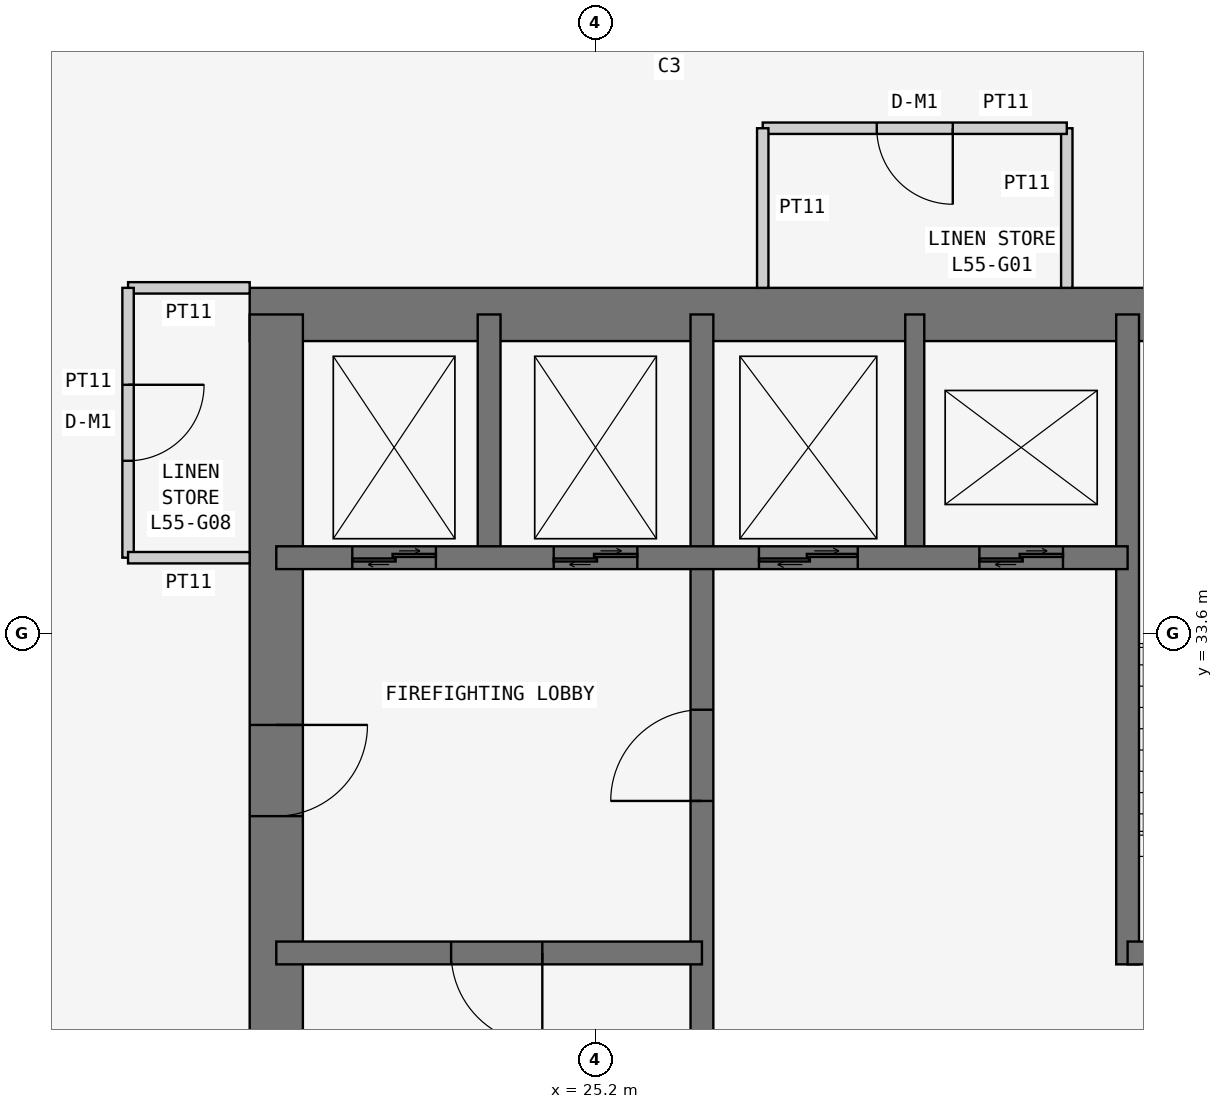
"""IFC4 building model, lengths in metres.
Left out: names, types, materials, properties, quantities, classifications, styles, units other than length and angle.
Written with IfcOpenShell. Run it as: python <this file> out.ifc"""

import sys

from ifc_helpers import new_model, si_unit, direction, frame, frame_2d, origin, place, context, subcontext, project, spatial, rectangle, extrude, element, fill, save


model = new_model("IFC4")
c1 = context("Model", 3, precision=1e-05, world=origin(), true_north=direction((0.0, 1.0)))
c2 = subcontext(c1, "Body", "Model", "MODEL_VIEW")
j1 = project(units=[si_unit("LENGTHUNIT", "METRE"), si_unit("PLANEANGLEUNIT", "RADIAN")], contexts=[c1])
p1 = place(None, origin())
s1 = spatial("IfcSite", under=j1, at=p1, CompositionType="ELEMENT")
p2 = place(p1, origin())
s2 = spatial("IfcBuilding", under=s1, at=p2, CompositionType="ELEMENT")
p3 = place(p2, frame((0.0, 0.0, 212.1)))
s3 = spatial("IfcBuildingStorey", under=s2, at=p3, CompositionType="ELEMENT", Elevation=212.1)
p4 = place(p3, frame((37.8, 37.8, 0.0), z_axis=(0.0, 0.0, 1.0), x_axis=(-1.0, 0.0, 0.0)))
e1 = element("IfcWall", 1, at=p4, inside=s3, PredefinedType="SHEAR", context=c2, shape_type="SweptSolid", body=[
    extrude(rectangle(XDim=17.15, YDim=0.7, at=frame_2d((8.575, 0.0))), origin(), (0.0, 0.0, 1.0), 3.6),
])
p5 = place(p3, frame((21.0, 37.8, 0.0), z_axis=(0.0, 0.0, 1.0), x_axis=(0.0, -1.0, 0.0)))
e2 = element("IfcWall", 2, at=p5, inside=s3, PredefinedType="SHEAR", context=c2, shape_type="SweptSolid", body=[
    extrude(rectangle(XDim=17.15, YDim=0.7, at=frame_2d((8.575, 0.0))), origin(), (0.0, 0.0, 1.0), 3.6),
])
p6 = place(p5, frame((5.4, 0.0, 0.0)))
e3 = element("IfcOpeningElement", 3, at=p6, cuts=e2, PredefinedType="OPENING", context=c2, shape_type="SweptSolid", body=[
    extrude(rectangle(XDim=1.2, YDim=2.1, at=frame_2d((0.6, 1.05))), frame((0.0, 0.36, 0.0), z_axis=(0.0, -1.0, 0.0), x_axis=(1.0, 0.0, 0.0)), (0.0, 0.0, 1.0), 0.72),
])
p7 = place(p3, frame((26.6, 21.0, 0.0), z_axis=(0.0, 0.0, 1.0), x_axis=(0.0, 1.0, 0.0)))
e4 = element("IfcWall", 4, at=p7, inside=s3, PredefinedType="SHEAR", context=c2, shape_type="SweptSolid", body=[
    extrude(rectangle(XDim=16.8, YDim=0.3, at=frame_2d((8.4, 0.0))), origin(), (0.0, 0.0, 1.0), 3.6),
])
p8 = place(p7, frame((10.4, 0.0, 0.0)))
e5 = element("IfcOpeningElement", 5, at=p8, cuts=e4, PredefinedType="OPENING", context=c2, shape_type="SweptSolid", body=[
    extrude(rectangle(XDim=1.2, YDim=2.1, at=frame_2d((0.6, 1.05))), frame((0.0, 0.16, 0.0), z_axis=(0.0, -1.0, 0.0), x_axis=(1.0, 0.0, 0.0)), (0.0, 0.0, 1.0), 0.32),
])
p9 = place(p3, frame((21.0, 29.4, 0.0), z_axis=(0.0, 0.0, 1.0), x_axis=(1.0, 0.0, 0.0)))
e6 = element("IfcWall", 6, at=p9, inside=s3, PredefinedType="SHEAR", context=c2, shape_type="SweptSolid", body=[
    extrude(rectangle(XDim=5.6, YDim=0.3, at=frame_2d((2.8, 0.0))), origin(), (0.0, 0.0, 1.0), 3.6),
])
p10 = place(p9, frame((2.3, 0.0, 0.0)))
e7 = element("IfcOpeningElement", 7, at=p10, cuts=e6, PredefinedType="OPENING", context=c2, shape_type="SweptSolid", body=[
    extrude(rectangle(XDim=1.2, YDim=2.1, at=frame_2d((0.6, 1.05))), frame((0.0, 0.16, 0.0), z_axis=(0.0, -1.0, 0.0), x_axis=(1.0, 0.0, 0.0)), (0.0, 0.0, 1.0), 0.32),
])
p11 = place(p3, frame((21.0, 34.6, 0.0), z_axis=(0.0, 0.0, 1.0), x_axis=(1.0, 0.0, 0.0)))
e8 = element("IfcWall", 8, at=p11, inside=s3, PredefinedType="SHEAR", context=c2, shape_type="SweptSolid", body=[
    extrude(rectangle(XDim=11.2, YDim=0.3, at=frame_2d((5.6, 0.0))), origin(), (0.0, 0.0, 1.0), 3.6),
])
p12 = place(p11, frame((9.25, 0.0, 0.0)))
e9 = element("IfcOpeningElement", 9, at=p12, cuts=e8, PredefinedType="OPENING", context=c2, shape_type="SweptSolid", body=[
    extrude(rectangle(XDim=1.1, YDim=2.1, at=frame_2d((0.55, 1.05))), frame((0.0, 0.16, 0.0), z_axis=(0.0, -1.0, 0.0), x_axis=(1.0, 0.0, 0.0)), (0.0, 0.0, 1.0), 0.32),
])
p13 = place(p11, frame((1.0, 0.0, 0.0)))
e10 = element("IfcOpeningElement", 10, at=p13, cuts=e8, PredefinedType="OPENING", context=c2, shape_type="SweptSolid", body=[
    extrude(rectangle(XDim=1.1, YDim=2.1, at=frame_2d((0.55, 1.05))), frame((0.0, 0.16, 0.0), z_axis=(0.0, -1.0, 0.0), x_axis=(1.0, 0.0, 0.0)), (0.0, 0.0, 1.0), 0.32),
])
p14 = place(p11, frame((3.65, 0.0, 0.0)))
e11 = element("IfcOpeningElement", 11, at=p14, cuts=e8, PredefinedType="OPENING", context=c2, shape_type="SweptSolid", body=[
    extrude(rectangle(XDim=1.1, YDim=2.1, at=frame_2d((0.55, 1.05))), frame((0.0, 0.16, 0.0), z_axis=(0.0, -1.0, 0.0), x_axis=(1.0, 0.0, 0.0)), (0.0, 0.0, 1.0), 0.32),
])
p15 = place(p11, frame((6.35, 0.0, 0.0)))
e12 = element("IfcOpeningElement", 12, at=p15, cuts=e8, PredefinedType="OPENING", context=c2, shape_type="SweptSolid", body=[
    extrude(rectangle(XDim=1.3, YDim=2.1, at=frame_2d((0.65, 1.05))), frame((0.0, 0.16, 0.0), z_axis=(0.0, -1.0, 0.0), x_axis=(1.0, 0.0, 0.0)), (0.0, 0.0, 1.0), 0.32),
])
p16 = place(p3, frame((23.8, 34.6, 0.0), z_axis=(0.0, 0.0, 1.0), x_axis=(0.0, 1.0, 0.0)))
e13 = element("IfcWall", 13, at=p16, inside=s3, PredefinedType="SHEAR", context=c2, shape_type="SweptSolid", body=[
    extrude(rectangle(XDim=3.2, YDim=0.3, at=frame_2d((1.6, 0.0))), origin(), (0.0, 0.0, 1.0), 3.6),
])
p17 = place(p3, frame((32.2, 29.25, 0.0), z_axis=(0.0, 0.0, 1.0), x_axis=(0.0, 1.0, 0.0)))
e14 = element("IfcWall", 14, at=p17, inside=s3, PredefinedType="SHEAR", context=c2, shape_type="SweptSolid", body=[
    extrude(rectangle(XDim=8.55, YDim=0.3, at=frame_2d((4.275, 0.0))), origin(), (0.0, 0.0, 1.0), 3.6),
])
p18 = place(p3, frame((32.2, 29.4, 0.0), z_axis=(0.0, 0.0, 1.0), x_axis=(1.0, 0.0, 0.0)))
e15 = element("IfcWall", 15, at=p18, inside=s3, PredefinedType="SHEAR", context=c2, shape_type="SweptSolid", body=[
    extrude(rectangle(XDim=5.6, YDim=0.3, at=frame_2d((2.8, 0.0))), origin(), (0.0, 0.0, 1.0), 3.6),
])
p19 = place(p18, frame((2.0, 0.0, 0.0)))
e16 = element("IfcOpeningElement", 16, at=p19, cuts=e15, PredefinedType="OPENING", context=c2, shape_type="SweptSolid", body=[
    extrude(rectangle(XDim=1.2, YDim=2.1, at=frame_2d((0.6, 1.05))), frame((0.0, 0.16, 0.0), z_axis=(0.0, -1.0, 0.0), x_axis=(1.0, 0.0, 0.0)), (0.0, 0.0, 1.0), 0.32),
])
p20 = place(p3, frame((29.4, 34.6, 0.0), z_axis=(0.0, 0.0, 1.0), x_axis=(0.0, 1.0, 0.0)))
e17 = element("IfcWall", 17, at=p20, inside=s3, PredefinedType="SHEAR", context=c2, shape_type="SweptSolid", body=[
    extrude(rectangle(XDim=3.2, YDim=0.25, at=frame_2d((1.6, 0.0))), origin(), (0.0, 0.0, 1.0), 3.6),
])
p21 = place(p3, frame((31.4, 38.15, 0.0), z_axis=(0.0, 0.0, 1.0), x_axis=(0.0, 1.0, 0.0)))
e18 = element("IfcWall", 18, at=p21, inside=s3, PredefinedType="PARTITIONING", context=c2, shape_type="SweptSolid", body=[
    extrude(rectangle(XDim=2.1, YDim=0.15, at=frame_2d((1.05, 0.0))), origin(), (0.0, 0.0, 1.0), 3.45),
])
p22 = place(p3, frame((31.4, 40.25, 0.0), z_axis=(0.0, 0.0, 1.0), x_axis=(-1.0, 0.0, 0.0)))
e19 = element("IfcWall", 19, at=p22, inside=s3, PredefinedType="PARTITIONING", context=c2, shape_type="SweptSolid", body=[
    extrude(rectangle(XDim=4.0, YDim=0.15, at=frame_2d((2.0, 0.0))), origin(), (0.0, 0.0, 1.0), 3.45),
])
p23 = place(p22, frame((1.5, 0.0, 0.0)))
e20 = element("IfcOpeningElement", 20, at=p23, cuts=e19, PredefinedType="OPENING", context=c2, shape_type="SweptSolid", body=[
    extrude(rectangle(XDim=1.0, YDim=2.1, at=frame_2d((0.5, 1.05))), frame((0.0, 0.085, 0.0), z_axis=(0.0, -1.0, 0.0), x_axis=(1.0, 0.0, 0.0)), (0.0, 0.0, 1.0), 0.17),
])
p24 = place(p3, frame((27.4, 40.25, 0.0), z_axis=(0.0, 0.0, 1.0), x_axis=(0.0, -1.0, 0.0)))
e21 = element("IfcWall", 21, at=p24, inside=s3, PredefinedType="PARTITIONING", context=c2, shape_type="SweptSolid", body=[
    extrude(rectangle(XDim=2.1, YDim=0.15, at=frame_2d((1.05, 0.0))), origin(), (0.0, 0.0, 1.0), 3.45),
])
p25 = place(p3, frame((20.65, 38.15, 0.0), z_axis=(0.0, 0.0, 1.0), x_axis=(-1.0, 0.0, 0.0)))
e22 = element("IfcWall", 22, at=p25, inside=s3, PredefinedType="PARTITIONING", context=c2, shape_type="SweptSolid", body=[
    extrude(rectangle(XDim=1.6, YDim=0.15, at=frame_2d((0.8, 0.0))), origin(), (0.0, 0.0, 1.0), 3.45),
])
p26 = place(p3, frame((19.05, 38.15, 0.0), z_axis=(0.0, 0.0, 1.0), x_axis=(0.0, -1.0, 0.0)))
e23 = element("IfcWall", 23, at=p26, inside=s3, PredefinedType="PARTITIONING", context=c2, shape_type="SweptSolid", body=[
    extrude(rectangle(XDim=3.55, YDim=0.15, at=frame_2d((1.775, 0.0))), origin(), (0.0, 0.0, 1.0), 3.45),
])
p27 = place(p26, frame((1.275, 0.0, 0.0)))
e24 = element("IfcOpeningElement", 24, at=p27, cuts=e23, PredefinedType="OPENING", context=c2, shape_type="SweptSolid", body=[
    extrude(rectangle(XDim=1.0, YDim=2.1, at=frame_2d((0.5, 1.05))), frame((0.0, 0.085, 0.0), z_axis=(0.0, -1.0, 0.0), x_axis=(1.0, 0.0, 0.0)), (0.0, 0.0, 1.0), 0.17),
])
p28 = place(p3, frame((19.05, 34.6, 0.0), z_axis=(0.0, 0.0, 1.0), x_axis=(1.0, 0.0, 0.0)))
e25 = element("IfcWall", 25, at=p28, inside=s3, PredefinedType="PARTITIONING", context=c2, shape_type="SweptSolid", body=[
    extrude(rectangle(XDim=1.6, YDim=0.15, at=frame_2d((0.8, 0.0))), origin(), (0.0, 0.0, 1.0), 3.45),
])
p29 = place(p23, origin())
e26 = element("IfcDoor", 26, at=p29, inside=s3, OperationType="SINGLE_SWING_LEFT", PredefinedType="DOOR", context=c2, shape_type="SweptSolid", body=[
    extrude(rectangle(XDim=1.0, YDim=2.1, at=frame_2d((0.5, 1.05))), frame((0.0, 0.025, 0.0), z_axis=(0.0, -1.0, 0.0), x_axis=(1.0, 0.0, 0.0)), (0.0, 0.0, 1.0), 0.05),
])
fill(e20, e26)
p30 = place(p27, origin())
e27 = element("IfcDoor", 27, at=p30, inside=s3, OperationType="SINGLE_SWING_LEFT", PredefinedType="DOOR", context=c2, shape_type="SweptSolid", body=[
    extrude(rectangle(XDim=1.0, YDim=2.1, at=frame_2d((0.5, 1.05))), frame((0.0, 0.025, 0.0), z_axis=(0.0, -1.0, 0.0), x_axis=(1.0, 0.0, 0.0)), (0.0, 0.0, 1.0), 0.05),
])
fill(e24, e27)
p31 = place(p6, origin())
e28 = element("IfcDoor", 28, at=p31, inside=s3, OperationType="SINGLE_SWING_LEFT", PredefinedType="DOOR", context=c2, shape_type="SweptSolid", body=[
    extrude(rectangle(XDim=1.2, YDim=2.1, at=frame_2d((0.6, 1.05))), frame((0.0, 0.025, 0.0), z_axis=(0.0, -1.0, 0.0), x_axis=(1.0, 0.0, 0.0)), (0.0, 0.0, 1.0), 0.05),
])
fill(e3, e28)
p32 = place(p10, frame((1.2, 0.0, 0.0), z_axis=(0.0, 0.0, 1.0), x_axis=(-1.0, 0.0, 0.0)))
e29 = element("IfcDoor", 29, at=p32, inside=s3, OperationType="SINGLE_SWING_LEFT", PredefinedType="DOOR", context=c2, shape_type="SweptSolid", body=[
    extrude(rectangle(XDim=1.2, YDim=2.1, at=frame_2d((0.6, 1.05))), frame((0.0, 0.025, 0.0), z_axis=(0.0, -1.0, 0.0), x_axis=(1.0, 0.0, 0.0)), (0.0, 0.0, 1.0), 0.05),
])
fill(e7, e29)
p33 = place(p8, origin())
e30 = element("IfcDoor", 30, at=p33, inside=s3, OperationType="SINGLE_SWING_LEFT", PredefinedType="DOOR", context=c2, shape_type="SweptSolid", body=[
    extrude(rectangle(XDim=1.2, YDim=2.1, at=frame_2d((0.6, 1.05))), frame((0.0, 0.025, 0.0), z_axis=(0.0, -1.0, 0.0), x_axis=(1.0, 0.0, 0.0)), (0.0, 0.0, 1.0), 0.05),
])
fill(e5, e30)
p34 = place(p12, origin())
e31 = element("IfcDoor", 31, at=p34, inside=s3, OperationType="DOUBLE_DOOR_SLIDING", PredefinedType="DOOR", context=c2, shape_type="SweptSolid", body=[
    extrude(rectangle(XDim=1.1, YDim=2.1, at=frame_2d((0.55, 1.05))), frame((0.0, 0.025, 0.0), z_axis=(0.0, -1.0, 0.0), x_axis=(1.0, 0.0, 0.0)), (0.0, 0.0, 1.0), 0.05),
])
fill(e9, e31)
p35 = place(p13, origin())
e32 = element("IfcDoor", 32, at=p35, inside=s3, OperationType="DOUBLE_DOOR_SLIDING", PredefinedType="DOOR", context=c2, shape_type="SweptSolid", body=[
    extrude(rectangle(XDim=1.1, YDim=2.1, at=frame_2d((0.55, 1.05))), frame((0.0, 0.025, 0.0), z_axis=(0.0, -1.0, 0.0), x_axis=(1.0, 0.0, 0.0)), (0.0, 0.0, 1.0), 0.05),
])
fill(e10, e32)
p36 = place(p14, origin())
e33 = element("IfcDoor", 33, at=p36, inside=s3, OperationType="DOUBLE_DOOR_SLIDING", PredefinedType="DOOR", context=c2, shape_type="SweptSolid", body=[
    extrude(rectangle(XDim=1.1, YDim=2.1, at=frame_2d((0.55, 1.05))), frame((0.0, 0.025, 0.0), z_axis=(0.0, -1.0, 0.0), x_axis=(1.0, 0.0, 0.0)), (0.0, 0.0, 1.0), 0.05),
])
fill(e11, e33)
p37 = place(p15, origin())
e34 = element("IfcDoor", 34, at=p37, inside=s3, OperationType="DOUBLE_DOOR_SLIDING", PredefinedType="DOOR", context=c2, shape_type="SweptSolid", body=[
    extrude(rectangle(XDim=1.3, YDim=2.1, at=frame_2d((0.65, 1.05))), frame((0.0, 0.025, 0.0), z_axis=(0.0, -1.0, 0.0), x_axis=(1.0, 0.0, 0.0)), (0.0, 0.0, 1.0), 0.05),
])
fill(e12, e34)
save(model, sys.argv[1])
